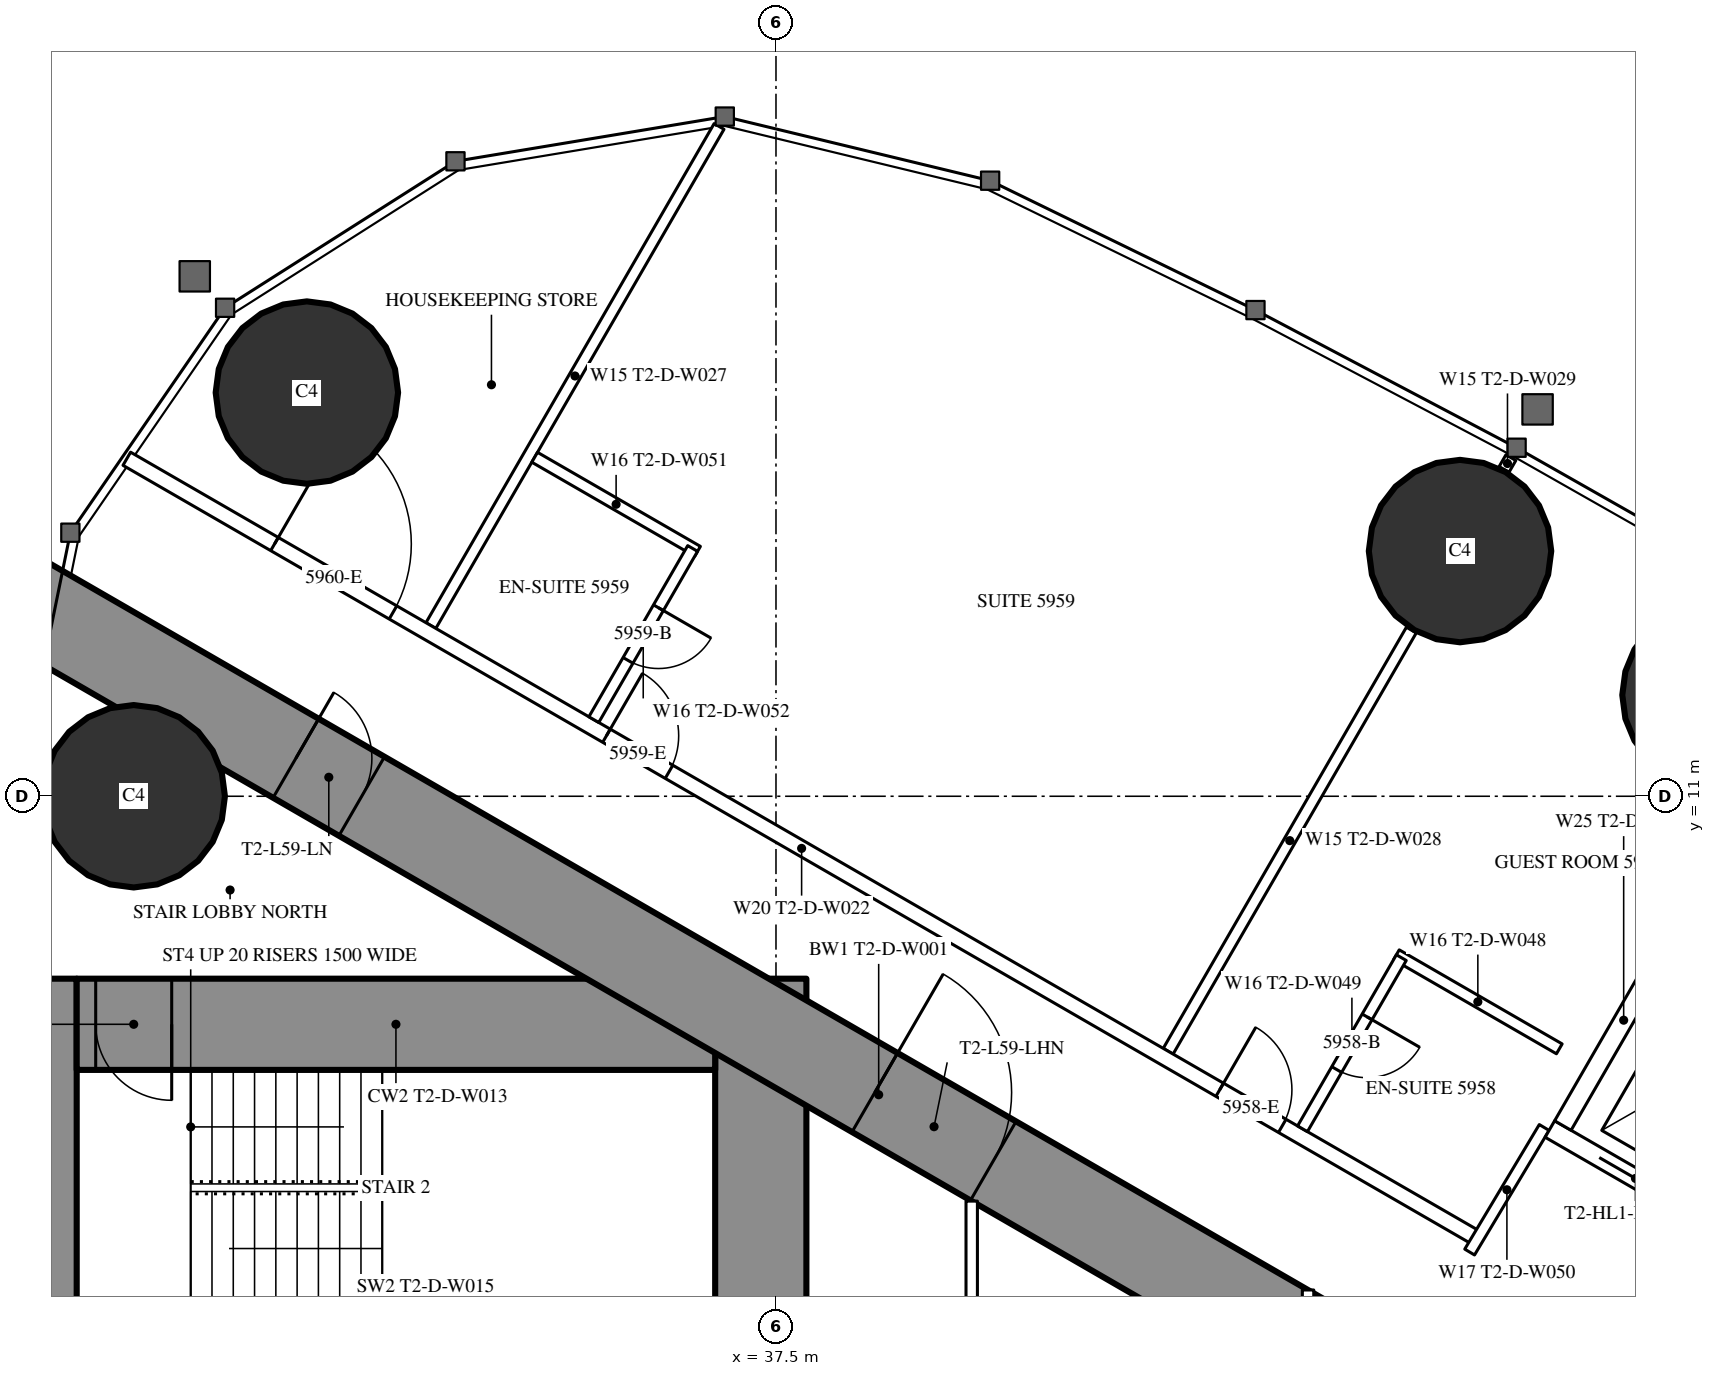
"""IFC4 building model, lengths in metres.
Left out: names, types, materials, properties, quantities, classifications, styles, units other than length and angle.
Written with IfcOpenShell. Run it as: python <this file> out.ifc"""

import sys

from ifc_helpers import new_model, si_unit, direction, frame, frame_2d, origin, origin_2d, place, context, subcontext, project, spatial, rectangle, circle, extrude, element, fill, save


model = new_model("IFC4")
c1 = context("Model", 3, precision=1e-05, world=origin(), true_north=direction((0.0, 1.0)))
c2 = subcontext(c1, "Body", "Model", "MODEL_VIEW")
j1 = project(units=[si_unit("LENGTHUNIT", "METRE"), si_unit("PLANEANGLEUNIT", "RADIAN")], contexts=[c1])
p1 = place(None, origin())
s1 = spatial("IfcSite", under=j1, at=p1, CompositionType="ELEMENT")
p2 = place(p1, origin())
s2 = spatial("IfcBuilding", under=s1, at=p2, CompositionType="ELEMENT")
p3 = place(p2, frame((0.0, 0.0, 222.5)))
s3 = spatial("IfcBuildingStorey", under=s2, at=p3, CompositionType="ELEMENT", Elevation=222.5)
for number, where, z_axis, x_axis in (
    (1, (31.328, 16.311, 0.0), (0.0, 0.0, 1.0), (1.0, 0.0, 0.0)),
    (2, (29.05, 11.0, 0.0), (0.0, 0.0, 1.0), (1.0, 0.0, 0.0)),
    (3, (49.834, 12.332, 0.0), (0.0, 0.0, 1.0), (1.0, 0.0, 0.0)),
    (4, (46.499, 14.226, 0.0), (0.0, 0.0, 1.0), (1.0, 0.0, 0.0)),
):
    element("IfcColumn", number, at=place(p3, frame(where, z_axis=z_axis, x_axis=x_axis)), inside=s3, PredefinedType="COLUMN", context=c2, shape_type="SweptSolid", body=[
        extrude(circle(Radius=1.2, at=origin_2d()), origin(), (0.0, 0.0, 1.0), 3.6),
    ])
p4 = place(p3, frame((27.9, -8.6, 0.0), z_axis=(0.0, 0.0, 1.0), x_axis=(0.0, 1.0, 0.0)))
e5 = element("IfcWall", 5, at=p4, inside=s3, PredefinedType="SHEAR", context=c2, shape_type="SweptSolid", body=[
    extrude(rectangle(XDim=17.2, YDim=0.8, at=frame_2d((8.6, 0.0))), origin(), (0.0, 0.0, 1.0), 3.6),
])
p5 = place(p4, frame((9.35, 0.0, 0.0)))
e6 = element("IfcOpeningElement", 6, at=p5, cuts=e5, PredefinedType="OPENING", context=c2, shape_type="SweptSolid", body=[
    extrude(rectangle(XDim=0.9, YDim=2.2, at=frame_2d((0.45, 1.1))), frame((0.0, 0.41, 0.0), z_axis=(0.0, -1.0, 0.0), x_axis=(1.0, 0.0, 0.0)), (0.0, 0.0, 1.0), 0.82),
])
p6 = place(p3, frame((37.3, -8.6, 0.0), z_axis=(0.0, 0.0, 1.0), x_axis=(0.0, 1.0, 0.0)))
e7 = element("IfcWall", 7, at=p6, inside=s3, PredefinedType="SHEAR", context=c2, shape_type="SweptSolid", body=[
    extrude(rectangle(XDim=17.2, YDim=1.2, at=frame_2d((8.6, 0.0))), origin(), (0.0, 0.0, 1.0), 3.6),
])
p7 = place(p6, frame((7.7, 0.0, 0.0)))
e8 = element("IfcOpeningElement", 8, at=p7, cuts=e7, PredefinedType="OPENING", context=c2, shape_type="SweptSolid", body=[
    extrude(rectangle(XDim=1.8, YDim=2.2, at=frame_2d((0.9, 1.1))), frame((0.0, 0.61, 0.0), z_axis=(0.0, -1.0, 0.0), x_axis=(1.0, 0.0, 0.0)), (0.0, 0.0, 1.0), 1.22),
])
p8 = place(p3, frame((28.3, 8.0, 0.0), z_axis=(0.0, 0.0, 1.0), x_axis=(1.0, 0.0, 0.0)))
e9 = element("IfcWall", 9, at=p8, inside=s3, PredefinedType="SHEAR", context=c2, shape_type="SweptSolid", body=[
    extrude(rectangle(XDim=8.4, YDim=1.2, at=frame_2d((4.2, 0.0))), origin(), (0.0, 0.0, 1.0), 3.6),
])
p9 = place(p8, frame((0.25, 0.0, 0.0)))
e10 = element("IfcOpeningElement", 10, at=p9, cuts=e9, PredefinedType="OPENING", context=c2, shape_type="SweptSolid", body=[
    extrude(rectangle(XDim=1.0, YDim=2.2, at=frame_2d((0.5, 1.1))), frame((0.0, 0.61, 0.0), z_axis=(0.0, -1.0, 0.0), x_axis=(1.0, 0.0, 0.0)), (0.0, 0.0, 1.0), 1.22),
])
p10 = place(p3, frame((27.2, 13.8, 0.0), z_axis=(0.0, 0.0, 1.0), x_axis=(0.866024515034, -0.500001539357, 0.0)))
e11 = element("IfcWall", 11, at=p10, inside=s3, PredefinedType="SHEAR", context=c2, shape_type="SweptSolid", body=[
    extrude(rectangle(XDim=26.907, YDim=1.2, at=frame_2d((13.454, 0.0))), origin(), (0.0, 0.0, 1.0), 3.6),
])
p11 = place(p10, frame((4.6, 0.0, 0.0)))
e12 = element("IfcOpeningElement", 12, at=p11, cuts=e11, PredefinedType="OPENING", context=c2, shape_type="SweptSolid", body=[
    extrude(rectangle(XDim=1.0, YDim=2.2, at=frame_2d((0.5, 1.1))), frame((0.0, 0.61, 0.0), z_axis=(0.0, -1.0, 0.0), x_axis=(1.0, 0.0, 0.0)), (0.0, 0.0, 1.0), 1.22),
])
p12 = place(p10, frame((13.395, 0.0, 0.0)))
e13 = element("IfcOpeningElement", 13, at=p12, cuts=e11, PredefinedType="OPENING", context=c2, shape_type="SweptSolid", body=[
    extrude(rectangle(XDim=1.8, YDim=2.2, at=frame_2d((0.9, 1.1))), frame((0.0, 0.61, 0.0), z_axis=(0.0, -1.0, 0.0), x_axis=(1.0, 0.0, 0.0)), (0.0, 0.0, 1.0), 1.22),
])
p13 = place(p3, frame((32.96, 13.246, 0.0), z_axis=(0.0, 0.0, 1.0), x_axis=(0.500000236886, 0.866025267018, 0.0)))
e14 = element("IfcWall", 14, at=p13, inside=s3, PredefinedType="PARTITIONING", context=c2, shape_type="SweptSolid", body=[
    extrude(rectangle(XDim=7.583, YDim=0.15, at=frame_2d((3.791, 0.0))), origin(), (0.0, 0.0, 1.0), 3.35),
])
p14 = place(p3, frame((42.66, 7.646, 0.0), z_axis=(0.0, 0.0, 1.0), x_axis=(0.499996592859, 0.866027370889, 0.0)))
e15 = element("IfcWall", 15, at=p14, inside=s3, PredefinedType="PARTITIONING", context=c2, shape_type="SweptSolid", body=[
    extrude(rectangle(XDim=6.398, YDim=0.15, at=frame_2d((3.199, 0.0))), origin(), (0.0, 0.0, 1.0), 2.45),
])
p15 = place(p3, frame((47.079, 15.3, 0.0), z_axis=(0.0, 0.0, 1.0), x_axis=(0.499212083968, 0.866479829667, 0.0)))
e16 = element("IfcWall", 16, at=p15, inside=s3, PredefinedType="PARTITIONING", context=c2, shape_type="SweptSolid", body=[
    extrude(rectangle(XDim=0.179, YDim=0.15, at=frame_2d((0.09, 0.0))), origin(), (0.0, 0.0, 1.0), 2.45),
])
p16 = place(p3, frame((28.959, 15.44, 0.0), z_axis=(0.0, 0.0, 1.0), x_axis=(0.866028936079, -0.499993881836, 0.0)))
e17 = element("IfcWall", 17, at=p16, inside=s3, PredefinedType="PARTITIONING", context=c2, shape_type="SweptSolid", body=[
    extrude(rectangle(XDim=20.503, YDim=0.2, at=frame_2d((10.251, 0.0))), origin(), (0.0, 0.0, 1.0), 3.35),
])
p17 = place(p16, frame((16.603, 0.0, 0.0)))
e18 = element("IfcOpeningElement", 18, at=p17, cuts=e17, PredefinedType="OPENING", context=c2, shape_type="SweptSolid", body=[
    extrude(rectangle(XDim=0.95, YDim=2.2, at=frame_2d((0.475, 1.1))), frame((0.0, 0.11, 0.0), z_axis=(0.0, -1.0, 0.0), x_axis=(1.0, 0.0, 0.0)), (0.0, 0.0, 1.0), 0.22),
])
p18 = place(p16, frame((7.287, 0.0, 0.0)))
e19 = element("IfcOpeningElement", 19, at=p18, cuts=e17, PredefinedType="OPENING", context=c2, shape_type="SweptSolid", body=[
    extrude(rectangle(XDim=0.95, YDim=2.2, at=frame_2d((0.475, 1.1))), frame((0.0, 0.11, 0.0), z_axis=(0.0, -1.0, 0.0), x_axis=(1.0, 0.0, 0.0)), (0.0, 0.0, 1.0), 0.22),
])
p19 = place(p16, frame((2.244, 0.0, 0.0)))
e20 = element("IfcOpeningElement", 20, at=p19, cuts=e17, PredefinedType="OPENING", context=c2, shape_type="SweptSolid", body=[
    extrude(rectangle(XDim=1.8, YDim=2.03, at=frame_2d((0.9, 1.015))), frame((0.0, 0.11, 0.0), z_axis=(0.0, -1.0, 0.0), x_axis=(1.0, 0.0, 0.0)), (0.0, 0.0, 1.0), 0.22),
])
p20 = place(p3, frame((47.606, 6.642, 0.0), z_axis=(0.0, 0.0, 1.0), x_axis=(-0.51353662755, -0.858067673418, 0.0)))
e21 = element("IfcWall", 21, at=p20, inside=s3, PredefinedType="PARTITIONING", context=c2, shape_type="SweptSolid", body=[
    extrude(rectangle(XDim=1.91, YDim=0.15, at=frame_2d((0.955, 0.0))), origin(), (0.0, 0.0, 1.0), 3.35),
])
p21 = place(p3, frame((45.662, 8.914, 0.0), z_axis=(0.0, 0.0, 1.0), x_axis=(0.86604923931, -0.499958713387, 0.0)))
e22 = element("IfcWall", 22, at=p21, inside=s3, PredefinedType="PARTITIONING", context=c2, shape_type="SweptSolid", body=[
    extrude(rectangle(XDim=2.475, YDim=0.15, at=frame_2d((1.237, 0.0))), origin(), (0.0, 0.0, 1.0), 3.35),
])
p22 = place(p3, frame((44.427, 6.625, 0.0), z_axis=(0.0, 0.0, 1.0), x_axis=(0.500006934395, 0.866021400173, 0.0)))
e23 = element("IfcWall", 23, at=p22, inside=s3, PredefinedType="PARTITIONING", context=c2, shape_type="SweptSolid", body=[
    extrude(rectangle(XDim=2.6, YDim=0.15, at=frame_2d((1.3, 0.0))), origin(), (0.0, 0.0, 1.0), 3.35),
])
p23 = place(p22, frame((0.9, 0.0, 0.0)))
e24 = element("IfcOpeningElement", 24, at=p23, cuts=e23, PredefinedType="OPENING", context=c2, shape_type="SweptSolid", body=[
    extrude(rectangle(XDim=0.8, YDim=2.2, at=frame_2d((0.4, 1.1))), frame((0.0, 0.085, 0.0), z_axis=(0.0, -1.0, 0.0), x_axis=(1.0, 0.0, 0.0)), (0.0, 0.0, 1.0), 0.17),
])
p24 = place(p3, frame((34.325, 15.46, 0.0), z_axis=(0.0, 0.0, 1.0), x_axis=(0.866031185235, -0.4999899861, 0.0)))
e25 = element("IfcWall", 25, at=p24, inside=s3, PredefinedType="PARTITIONING", context=c2, shape_type="SweptSolid", body=[
    extrude(rectangle(XDim=2.475, YDim=0.15, at=frame_2d((1.238, 0.0))), origin(), (0.0, 0.0, 1.0), 3.35),
])
p25 = place(p3, frame((35.104, 12.008, 0.0), z_axis=(0.0, 0.0, 1.0), x_axis=(0.500047596559, 0.865997922154, 0.0)))
e26 = element("IfcWall", 26, at=p25, inside=s3, PredefinedType="PARTITIONING", context=c2, shape_type="SweptSolid", body=[
    extrude(rectangle(XDim=2.6, YDim=0.15, at=frame_2d((1.3, 0.0))), origin(), (0.0, 0.0, 1.0), 3.35),
])
p26 = place(p25, frame((0.9, 0.0, 0.0)))
e27 = element("IfcOpeningElement", 27, at=p26, cuts=e26, PredefinedType="OPENING", context=c2, shape_type="SweptSolid", body=[
    extrude(rectangle(XDim=0.8, YDim=2.2, at=frame_2d((0.4, 1.1))), frame((0.0, 0.085, 0.0), z_axis=(0.0, -1.0, 0.0), x_axis=(1.0, 0.0, 0.0)), (0.0, 0.0, 1.0), 0.17),
])
p27 = place(p3, frame((40.075, -5.674, 0.0), z_axis=(0.0, 0.0, 1.0), x_axis=(0.0, 1.0, 0.0)))
e28 = element("IfcWall", 28, at=p27, inside=s3, PredefinedType="PARTITIONING", context=c2, shape_type="SweptSolid", body=[
    extrude(rectangle(XDim=11.348, YDim=0.15, at=frame_2d((5.674, 0.0))), origin(), (0.0, 0.0, 1.0), 3.35),
])
p28 = place(p27, frame((4.774, 0.0, 0.0)))
e29 = element("IfcOpeningElement", 29, at=p28, cuts=e28, PredefinedType="OPENING", context=c2, shape_type="SweptSolid", body=[
    extrude(rectangle(XDim=1.8, YDim=2.2, at=frame_2d((0.9, 1.1))), frame((0.0, 0.085, 0.0), z_axis=(0.0, -1.0, 0.0), x_axis=(1.0, 0.0, 0.0)), (0.0, 0.0, 1.0), 0.17),
])
p29 = place(p3, frame((44.5, -4.505, 0.0), z_axis=(0.0, 0.0, 1.0), x_axis=(0.0, 1.0, 0.0)))
e30 = element("IfcWall", 30, at=p29, inside=s3, PredefinedType="PARTITIONING", context=c2, shape_type="SweptSolid", body=[
    extrude(rectangle(XDim=9.009, YDim=0.15, at=frame_2d((4.505, 0.0))), origin(), (0.0, 0.0, 1.0), 3.35),
])
p30 = place(p29, frame((1.752, 0.0, 0.0)))
e31 = element("IfcOpeningElement", 31, at=p30, cuts=e30, PredefinedType="OPENING", context=c2, shape_type="SweptSolid", body=[
    extrude(rectangle(XDim=1.0, YDim=2.2, at=frame_2d((0.5, 1.1))), frame((0.0, 0.085, 0.0), z_axis=(0.0, -1.0, 0.0), x_axis=(1.0, 0.0, 0.0)), (0.0, 0.0, 1.0), 0.17),
])
p31 = place(p29, frame((6.257, 0.0, 0.0)))
e32 = element("IfcOpeningElement", 32, at=p31, cuts=e30, PredefinedType="OPENING", context=c2, shape_type="SweptSolid", body=[
    extrude(rectangle(XDim=1.0, YDim=2.2, at=frame_2d((0.5, 1.1))), frame((0.0, 0.085, 0.0), z_axis=(0.0, -1.0, 0.0), x_axis=(1.0, 0.0, 0.0)), (0.0, 0.0, 1.0), 0.17),
])
p32 = place(p3, frame((47.681, 6.622, 0.0), z_axis=(0.0, 0.0, 1.0), x_axis=(0.86603344179, -0.499986077507, 0.0)))
e33 = element("IfcWall", 33, at=p32, inside=s3, PredefinedType="PARTITIONING", context=c2, shape_type="SweptSolid", body=[
    extrude(rectangle(XDim=6.6, YDim=0.25, at=frame_2d((3.3, 0.0))), origin(), (0.0, 0.0, 1.0), 3.35),
])
p33 = place(p32, frame((0.75, 0.0, 0.0)))
e34 = element("IfcOpeningElement", 34, at=p33, cuts=e33, PredefinedType="OPENING", context=c2, shape_type="SweptSolid", body=[
    extrude(rectangle(XDim=1.1, YDim=2.2, at=frame_2d((0.55, 1.1))), frame((0.0, 0.135, 0.0), z_axis=(0.0, -1.0, 0.0), x_axis=(1.0, 0.0, 0.0)), (0.0, 0.0, 1.0), 0.27),
])
p34 = place(p32, frame((2.75, 0.0, 0.0)))
e35 = element("IfcOpeningElement", 35, at=p34, cuts=e33, PredefinedType="OPENING", context=c2, shape_type="SweptSolid", body=[
    extrude(rectangle(XDim=1.1, YDim=2.2, at=frame_2d((0.55, 1.1))), frame((0.0, 0.135, 0.0), z_axis=(0.0, -1.0, 0.0), x_axis=(1.0, 0.0, 0.0)), (0.0, 0.0, 1.0), 0.27),
])
p35 = place(p32, frame((4.75, 0.0, 0.0)))
e36 = element("IfcOpeningElement", 36, at=p35, cuts=e33, PredefinedType="OPENING", context=c2, shape_type="SweptSolid", body=[
    extrude(rectangle(XDim=1.1, YDim=2.2, at=frame_2d((0.55, 1.1))), frame((0.0, 0.135, 0.0), z_axis=(0.0, -1.0, 0.0), x_axis=(1.0, 0.0, 0.0)), (0.0, 0.0, 1.0), 0.27),
])
p36 = place(p3, frame((47.852, 6.668, 0.0), z_axis=(0.0, 0.0, 1.0), x_axis=(0.499929347863, 0.866066190972, 0.0)))
e37 = element("IfcWall", 37, at=p36, inside=s3, PredefinedType="PARTITIONING", context=c2, shape_type="SweptSolid", body=[
    extrude(rectangle(XDim=3.201, YDim=0.25, at=frame_2d((1.6, 0.0))), origin(), (0.0, 0.0, 1.0), 3.35),
])
p37 = place(p23, origin())
e38 = element("IfcDoor", 38, at=p37, inside=s3, OperationType="SINGLE_SWING_RIGHT", PredefinedType="DOOR", context=c2, shape_type="SweptSolid", body=[
    extrude(rectangle(XDim=0.8, YDim=2.2, at=frame_2d((0.4, 1.1))), frame((0.0, 0.025, 0.0), z_axis=(0.0, -1.0, 0.0), x_axis=(1.0, 0.0, 0.0)), (0.0, 0.0, 1.0), 0.05),
])
fill(e24, e38)
p38 = place(p17, origin())
e39 = element("IfcDoor", 39, at=p38, inside=s3, OperationType="SINGLE_SWING_LEFT", PredefinedType="DOOR", context=c2, shape_type="SweptSolid", body=[
    extrude(rectangle(XDim=0.95, YDim=2.2, at=frame_2d((0.475, 1.1))), frame((0.0, 0.025, 0.0), z_axis=(0.0, -1.0, 0.0), x_axis=(1.0, 0.0, 0.0)), (0.0, 0.0, 1.0), 0.05),
])
fill(e18, e39)
p39 = place(p26, origin())
e40 = element("IfcDoor", 40, at=p39, inside=s3, OperationType="SINGLE_SWING_RIGHT", PredefinedType="DOOR", context=c2, shape_type="SweptSolid", body=[
    extrude(rectangle(XDim=0.8, YDim=2.2, at=frame_2d((0.4, 1.1))), frame((0.0, 0.025, 0.0), z_axis=(0.0, -1.0, 0.0), x_axis=(1.0, 0.0, 0.0)), (0.0, 0.0, 1.0), 0.05),
])
fill(e27, e40)
p40 = place(p18, origin())
e41 = element("IfcDoor", 41, at=p40, inside=s3, OperationType="SINGLE_SWING_LEFT", PredefinedType="DOOR", context=c2, shape_type="SweptSolid", body=[
    extrude(rectangle(XDim=0.95, YDim=2.2, at=frame_2d((0.475, 1.1))), frame((0.0, 0.025, 0.0), z_axis=(0.0, -1.0, 0.0), x_axis=(1.0, 0.0, 0.0)), (0.0, 0.0, 1.0), 0.05),
])
fill(e19, e41)
p41 = place(p19, origin())
e42 = element("IfcDoor", 42, at=p41, inside=s3, OperationType="DOUBLE_DOOR_SINGLE_SWING", PredefinedType="DOOR", context=c2, shape_type="SweptSolid", body=[
    extrude(rectangle(XDim=1.8, YDim=2.03, at=frame_2d((0.9, 1.015))), frame((0.0, 0.025, 0.0), z_axis=(0.0, -1.0, 0.0), x_axis=(1.0, 0.0, 0.0)), (0.0, 0.0, 1.0), 0.05),
])
fill(e20, e42)
p42 = place(p11, origin())
e43 = element("IfcDoor", 43, at=p42, inside=s3, OperationType="SINGLE_SWING_LEFT", PredefinedType="DOOR", context=c2, shape_type="SweptSolid", body=[
    extrude(rectangle(XDim=1.0, YDim=2.2, at=frame_2d((0.5, 1.1))), frame((0.0, 0.025, 0.0), z_axis=(0.0, -1.0, 0.0), x_axis=(1.0, 0.0, 0.0)), (0.0, 0.0, 1.0), 0.05),
])
fill(e12, e43)
p43 = place(p12, origin())
e44 = element("IfcDoor", 44, at=p43, inside=s3, OperationType="DOUBLE_DOOR_SINGLE_SWING", PredefinedType="DOOR", context=c2, shape_type="SweptSolid", body=[
    extrude(rectangle(XDim=1.8, YDim=2.2, at=frame_2d((0.9, 1.1))), frame((0.0, 0.025, 0.0), z_axis=(0.0, -1.0, 0.0), x_axis=(1.0, 0.0, 0.0)), (0.0, 0.0, 1.0), 0.05),
])
fill(e13, e44)
p44 = place(p9, origin())
e45 = element("IfcDoor", 45, at=p44, inside=s3, OperationType="SINGLE_SWING_RIGHT", PredefinedType="DOOR", context=c2, shape_type="SweptSolid", body=[
    extrude(rectangle(XDim=1.0, YDim=2.2, at=frame_2d((0.5, 1.1))), frame((0.0, 0.025, 0.0), z_axis=(0.0, -1.0, 0.0), x_axis=(1.0, 0.0, 0.0)), (0.0, 0.0, 1.0), 0.05),
])
fill(e10, e45)
p45 = place(p33, origin())
e46 = element("IfcDoor", 46, at=p45, inside=s3, OperationType="DOUBLE_DOOR_SLIDING", PredefinedType="USERDEFINED", context=c2, shape_type="SweptSolid", body=[
    extrude(rectangle(XDim=1.1, YDim=2.2, at=frame_2d((0.55, 1.1))), frame((0.0, 0.025, 0.0), z_axis=(0.0, -1.0, 0.0), x_axis=(1.0, 0.0, 0.0)), (0.0, 0.0, 1.0), 0.05),
])
fill(e34, e46)
save(model, sys.argv[1])
